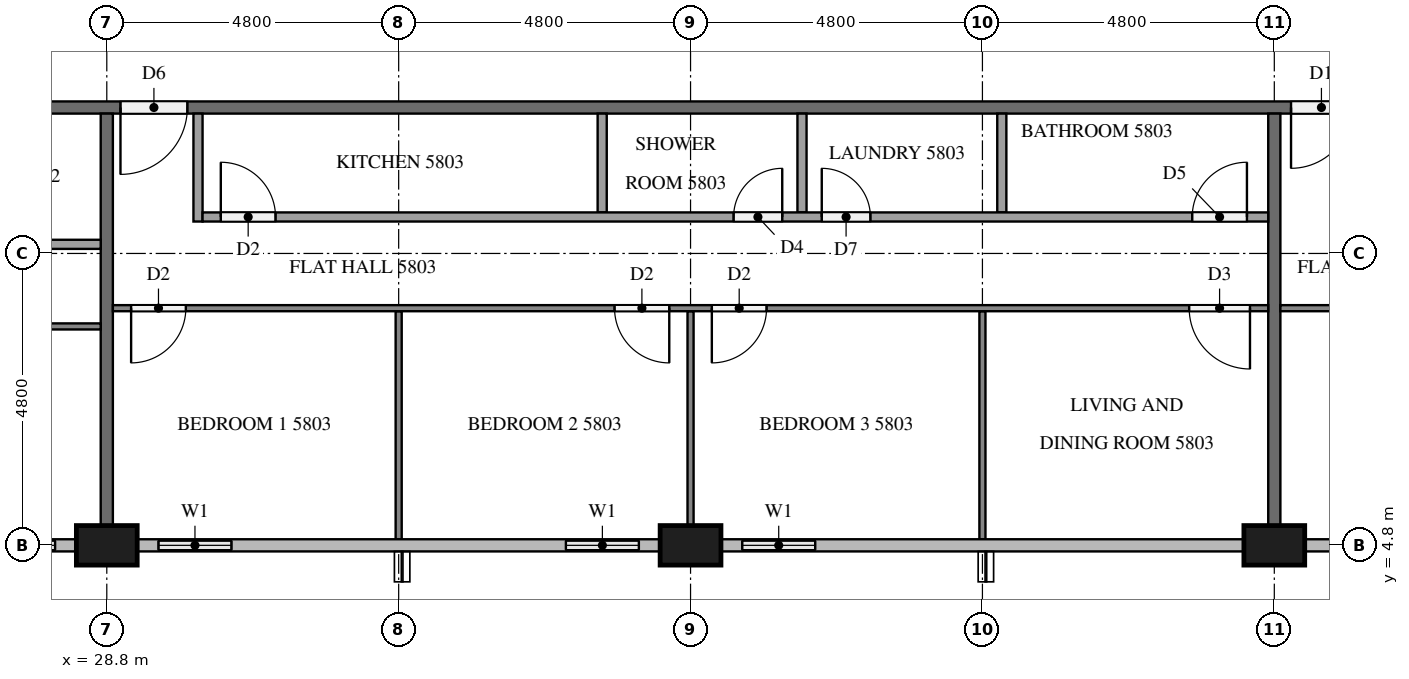
"""IFC4 building model, lengths in metres.
Left out: names, types, materials, properties, quantities, classifications, styles, units other than length and angle.
Written with IfcOpenShell. Run it as: python <this file> out.ifc"""

import sys

from ifc_helpers import new_model, si_unit, direction, frame, frame_2d, origin, origin_2d, place, context, subcontext, project, spatial, rectangle, extrude, element, fill, save


model = new_model("IFC4")
c1 = context("Model", 3, precision=1e-05, world=origin(), true_north=direction((0.0, 1.0)))
c2 = subcontext(c1, "Body", "Model", "MODEL_VIEW")
j1 = project(units=[si_unit("LENGTHUNIT", "METRE"), si_unit("PLANEANGLEUNIT", "RADIAN")], contexts=[c1])
p1 = place(None, origin())
s1 = spatial("IfcSite", under=j1, at=p1, CompositionType="ELEMENT")
p2 = place(p1, origin())
s2 = spatial("IfcBuilding", under=s1, at=p2, CompositionType="ELEMENT")
p3 = place(p2, frame((0.0, 0.0, 222.8)))
s3 = spatial("IfcBuildingStorey", under=s2, at=p3, CompositionType="ELEMENT", Elevation=222.8)
for number, where, z_axis, x_axis in (
    (1, (28.8, 4.8, 0.0), (0.0, 0.0, 1.0), (1.0, 0.0, 0.0)),
    (2, (38.4, 4.8, 0.0), (0.0, 0.0, 1.0), (1.0, 0.0, 0.0)),
    (3, (48.0, 4.8, 0.0), (0.0, 0.0, 1.0), (1.0, 0.0, 0.0)),
):
    element("IfcColumn", number, at=place(p3, frame(where, z_axis=z_axis, x_axis=x_axis)), inside=s3, PredefinedType="COLUMN", context=c2, shape_type="SweptSolid", body=[
        extrude(rectangle(XDim=1.0, YDim=0.65, at=origin_2d()), origin(), (0.0, 0.0, 1.0), 3.2),
    ])
p4 = place(p3, frame((26.4, 4.8, 0.0), z_axis=(0.0, 0.0, 1.0), x_axis=(1.0, 0.0, 0.0)))
e4 = element("IfcWall", 4, at=p4, inside=s3, PredefinedType="SOLIDWALL", context=c2, shape_type="SweptSolid", body=[
    extrude(rectangle(XDim=1.9, YDim=0.15, at=frame_2d((0.95, 0.0))), origin(), (0.0, 0.0, 1.0), 3.2),
])
p5 = place(p4, frame((0.35, 0.0, 0.9)))
e5 = element("IfcOpeningElement", 5, at=p5, cuts=e4, PredefinedType="OPENING", context=c2, shape_type="SweptSolid", body=[
    extrude(rectangle(XDim=1.2, YDim=1.4, at=frame_2d((0.6, 0.7))), frame((0.0, 0.085, 0.0), z_axis=(0.0, -1.0, 0.0), x_axis=(1.0, 0.0, 0.0)), (0.0, 0.0, 1.0), 0.17),
])
p6 = place(p3, frame((29.3, 4.8, 0.0), z_axis=(0.0, 0.0, 1.0), x_axis=(1.0, 0.0, 0.0)))
e6 = element("IfcWall", 6, at=p6, inside=s3, PredefinedType="SOLIDWALL", context=c2, shape_type="SweptSolid", body=[
    extrude(rectangle(XDim=1.9, YDim=0.15, at=frame_2d((0.95, 0.0))), origin(), (0.0, 0.0, 1.0), 3.2),
])
p7 = place(p6, frame((0.35, 0.0, 0.9)))
e7 = element("IfcOpeningElement", 7, at=p7, cuts=e6, PredefinedType="OPENING", context=c2, shape_type="SweptSolid", body=[
    extrude(rectangle(XDim=1.2, YDim=1.4, at=frame_2d((0.6, 0.7))), frame((0.0, 0.085, 0.0), z_axis=(0.0, -1.0, 0.0), x_axis=(1.0, 0.0, 0.0)), (0.0, 0.0, 1.0), 0.17),
])
p8 = place(p3, frame((36.0, 4.8, 0.0), z_axis=(0.0, 0.0, 1.0), x_axis=(1.0, 0.0, 0.0)))
e8 = element("IfcWall", 8, at=p8, inside=s3, PredefinedType="SOLIDWALL", context=c2, shape_type="SweptSolid", body=[
    extrude(rectangle(XDim=1.9, YDim=0.15, at=frame_2d((0.95, 0.0))), origin(), (0.0, 0.0, 1.0), 3.2),
])
p9 = place(p8, frame((0.35, 0.0, 0.9)))
e9 = element("IfcOpeningElement", 9, at=p9, cuts=e8, PredefinedType="OPENING", context=c2, shape_type="SweptSolid", body=[
    extrude(rectangle(XDim=1.2, YDim=1.4, at=frame_2d((0.6, 0.7))), frame((0.0, 0.085, 0.0), z_axis=(0.0, -1.0, 0.0), x_axis=(1.0, 0.0, 0.0)), (0.0, 0.0, 1.0), 0.17),
])
p10 = place(p3, frame((38.9, 4.8, 0.0), z_axis=(0.0, 0.0, 1.0), x_axis=(1.0, 0.0, 0.0)))
e10 = element("IfcWall", 10, at=p10, inside=s3, PredefinedType="SOLIDWALL", context=c2, shape_type="SweptSolid", body=[
    extrude(rectangle(XDim=1.9, YDim=0.15, at=frame_2d((0.95, 0.0))), origin(), (0.0, 0.0, 1.0), 3.2),
])
p11 = place(p10, frame((0.35, 0.0, 0.9)))
e11 = element("IfcOpeningElement", 11, at=p11, cuts=e10, PredefinedType="OPENING", context=c2, shape_type="SweptSolid", body=[
    extrude(rectangle(XDim=1.2, YDim=1.4, at=frame_2d((0.6, 0.7))), frame((0.0, 0.085, 0.0), z_axis=(0.0, -1.0, 0.0), x_axis=(1.0, 0.0, 0.0)), (0.0, 0.0, 1.0), 0.17),
])
p12 = place(p3, frame((50.5, 12.0, 0.0), z_axis=(0.0, 0.0, 1.0), x_axis=(-1.0, 0.0, 0.0)))
e12 = element("IfcWall", 12, at=p12, inside=s3, PredefinedType="PARTITIONING", context=c2, shape_type="SweptSolid", body=[
    extrude(rectangle(XDim=38.6, YDim=0.2, at=frame_2d((19.3, 0.0))), origin(), (0.0, 0.0, 1.0), 3.2),
])
p13 = place(p12, frame((36.375, 0.0, 0.0)))
e13 = element("IfcOpeningElement", 13, at=p13, cuts=e12, PredefinedType="OPENING", context=c2, shape_type="SweptSolid", body=[
    extrude(rectangle(XDim=1.0, YDim=2.1, at=frame_2d((0.5, 1.05))), frame((0.0, 0.11, 0.0), z_axis=(0.0, -1.0, 0.0), x_axis=(1.0, 0.0, 0.0)), (0.0, 0.0, 1.0), 0.22),
])
p14 = place(p12, frame((34.825, 0.0, 0.0)))
e14 = element("IfcOpeningElement", 14, at=p14, cuts=e12, PredefinedType="OPENING", context=c2, shape_type="SweptSolid", body=[
    extrude(rectangle(XDim=1.0, YDim=2.1, at=frame_2d((0.5, 1.05))), frame((0.0, 0.11, 0.0), z_axis=(0.0, -1.0, 0.0), x_axis=(1.0, 0.0, 0.0)), (0.0, 0.0, 1.0), 0.22),
])
p15 = place(p12, frame((20.375, 0.0, 0.0)))
e15 = element("IfcOpeningElement", 15, at=p15, cuts=e12, PredefinedType="OPENING", context=c2, shape_type="SweptSolid", body=[
    extrude(rectangle(XDim=1.1, YDim=2.1, at=frame_2d((0.55, 1.05))), frame((0.0, 0.11, 0.0), z_axis=(0.0, -1.0, 0.0), x_axis=(1.0, 0.0, 0.0)), (0.0, 0.0, 1.0), 0.22),
])
p16 = place(p12, frame((1.225, 0.0, 0.0)))
e16 = element("IfcOpeningElement", 16, at=p16, cuts=e12, PredefinedType="OPENING", context=c2, shape_type="SweptSolid", body=[
    extrude(rectangle(XDim=1.0, YDim=2.1, at=frame_2d((0.5, 1.05))), frame((0.0, 0.11, 0.0), z_axis=(0.0, -1.0, 0.0), x_axis=(1.0, 0.0, 0.0)), (0.0, 0.0, 1.0), 0.22),
])
for number, where, z_axis, x_axis in (
    (17, (28.8, 11.9, 0.0), (0.0, 0.0, 1.0), (0.0, -1.0, 0.0)),
    (18, (48.0, 11.9, 0.0), (0.0, 0.0, 1.0), (0.0, -1.0, 0.0)),
):
    element("IfcWall", number, at=place(p3, frame(where, z_axis=z_axis, x_axis=x_axis)), inside=s3, PredefinedType="PARTITIONING", context=c2, shape_type="SweptSolid", body=[
        extrude(rectangle(XDim=6.775, YDim=0.2, at=frame_2d((3.387, 0.0))), origin(), (0.0, 0.0, 1.0), 3.2),
    ])
p17 = place(p3, frame((28.7, 8.4, 0.0), z_axis=(0.0, 0.0, 1.0), x_axis=(-1.0, 0.0, 0.0)))
e19 = element("IfcWall", 19, at=p17, inside=s3, PredefinedType="PARTITIONING", context=c2, shape_type="SweptSolid", body=[
    extrude(rectangle(XDim=14.2, YDim=0.1, at=frame_2d((7.1, 0.0))), origin(), (0.0, 0.0, 1.0), 3.2),
])
p18 = place(p17, frame((12.9, 0.0, 0.0)))
e20 = element("IfcOpeningElement", 20, at=p18, cuts=e19, PredefinedType="OPENING", context=c2, shape_type="SweptSolid", body=[
    extrude(rectangle(XDim=1.0, YDim=2.1, at=frame_2d((0.5, 1.05))), frame((0.0, 0.06, 0.0), z_axis=(0.0, -1.0, 0.0), x_axis=(1.0, 0.0, 0.0)), (0.0, 0.0, 1.0), 0.12),
])
p19 = place(p17, frame((5.05, 0.0, 0.0)))
e21 = element("IfcOpeningElement", 21, at=p19, cuts=e19, PredefinedType="OPENING", context=c2, shape_type="SweptSolid", body=[
    extrude(rectangle(XDim=0.9, YDim=2.1, at=frame_2d((0.45, 1.05))), frame((0.0, 0.06, 0.0), z_axis=(0.0, -1.0, 0.0), x_axis=(1.0, 0.0, 0.0)), (0.0, 0.0, 1.0), 0.12),
])
p20 = place(p17, frame((3.45, 0.0, 0.0)))
e22 = element("IfcOpeningElement", 22, at=p20, cuts=e19, PredefinedType="OPENING", context=c2, shape_type="SweptSolid", body=[
    extrude(rectangle(XDim=0.9, YDim=2.1, at=frame_2d((0.45, 1.05))), frame((0.0, 0.06, 0.0), z_axis=(0.0, -1.0, 0.0), x_axis=(1.0, 0.0, 0.0)), (0.0, 0.0, 1.0), 0.12),
])
p21 = place(p3, frame((15.975, 9.75, 0.0), z_axis=(0.0, 0.0, 1.0), x_axis=(1.0, 0.0, 0.0)))
e23 = element("IfcWall", 23, at=p21, inside=s3, PredefinedType="PARTITIONING", context=c2, shape_type="SweptSolid", body=[
    extrude(rectangle(XDim=12.725, YDim=0.15, at=frame_2d((6.362, 0.0))), origin(), (0.0, 0.0, 1.0), 3.2),
])
p22 = place(p21, frame((0.3, 0.0, 0.0)))
e24 = element("IfcOpeningElement", 24, at=p22, cuts=e23, PredefinedType="OPENING", context=c2, shape_type="SweptSolid", body=[
    extrude(rectangle(XDim=0.8, YDim=2.1, at=frame_2d((0.4, 1.05))), frame((0.0, 0.085, 0.0), z_axis=(0.0, -1.0, 0.0), x_axis=(1.0, 0.0, 0.0)), (0.0, 0.0, 1.0), 0.17),
])
p23 = place(p21, frame((7.585, 0.0, 0.0)))
e25 = element("IfcOpeningElement", 25, at=p23, cuts=e23, PredefinedType="OPENING", context=c2, shape_type="SweptSolid", body=[
    extrude(rectangle(XDim=0.9, YDim=2.1, at=frame_2d((0.45, 1.05))), frame((0.0, 0.085, 0.0), z_axis=(0.0, -1.0, 0.0), x_axis=(1.0, 0.0, 0.0)), (0.0, 0.0, 1.0), 0.17),
])
p24 = place(p21, frame((9.135, 0.0, 0.0)))
e26 = element("IfcOpeningElement", 26, at=p24, cuts=e23, PredefinedType="OPENING", context=c2, shape_type="SweptSolid", body=[
    extrude(rectangle(XDim=0.9, YDim=2.1, at=frame_2d((0.45, 1.05))), frame((0.0, 0.085, 0.0), z_axis=(0.0, -1.0, 0.0), x_axis=(1.0, 0.0, 0.0)), (0.0, 0.0, 1.0), 0.17),
])
p25 = place(p3, frame((33.6, 8.65, 0.0), z_axis=(0.0, 0.0, 1.0), x_axis=(0.0, -1.0, 0.0)))
e27 = element("IfcWall", 27, at=p25, inside=s3, PredefinedType="PARTITIONING", context=c2, shape_type="SweptSolid", body=[
    extrude(rectangle(XDim=3.75, YDim=0.1, at=frame_2d((1.875, 0.0))), origin(), (0.0, 0.0, 1.0), 3.2),
])
p26 = place(p3, frame((38.4, 8.65, 0.0), z_axis=(0.0, 0.0, 1.0), x_axis=(0.0, -1.0, 0.0)))
e28 = element("IfcWall", 28, at=p26, inside=s3, PredefinedType="PARTITIONING", context=c2, shape_type="SweptSolid", body=[
    extrude(rectangle(XDim=3.525, YDim=0.1, at=frame_2d((1.762, 0.0))), origin(), (0.0, 0.0, 1.0), 3.2),
])
p27 = place(p3, frame((43.2, 8.65, 0.0), z_axis=(0.0, 0.0, 1.0), x_axis=(0.0, -1.0, 0.0)))
e29 = element("IfcWall", 29, at=p27, inside=s3, PredefinedType="PARTITIONING", context=c2, shape_type="SweptSolid", body=[
    extrude(rectangle(XDim=3.75, YDim=0.1, at=frame_2d((1.875, 0.0))), origin(), (0.0, 0.0, 1.0), 3.2),
])
p28 = place(p3, frame((47.9, 8.7, 0.0), z_axis=(0.0, 0.0, 1.0), x_axis=(-1.0, 0.0, 0.0)))
e30 = element("IfcWall", 30, at=p28, inside=s3, PredefinedType="PARTITIONING", context=c2, shape_type="SweptSolid", body=[
    extrude(rectangle(XDim=19.0, YDim=0.1, at=frame_2d((9.5, 0.0))), origin(), (0.0, 0.0, 1.0), 3.2),
])
p29 = place(p28, frame((17.8, 0.0, 0.0)))
e31 = element("IfcOpeningElement", 31, at=p29, cuts=e30, PredefinedType="OPENING", context=c2, shape_type="SweptSolid", body=[
    extrude(rectangle(XDim=0.9, YDim=2.1, at=frame_2d((0.45, 1.05))), frame((0.0, 0.06, 0.0), z_axis=(0.0, -1.0, 0.0), x_axis=(1.0, 0.0, 0.0)), (0.0, 0.0, 1.0), 0.12),
])
p30 = place(p28, frame((9.85, 0.0, 0.0)))
e32 = element("IfcOpeningElement", 32, at=p30, cuts=e30, PredefinedType="OPENING", context=c2, shape_type="SweptSolid", body=[
    extrude(rectangle(XDim=0.9, YDim=2.1, at=frame_2d((0.45, 1.05))), frame((0.0, 0.06, 0.0), z_axis=(0.0, -1.0, 0.0), x_axis=(1.0, 0.0, 0.0)), (0.0, 0.0, 1.0), 0.12),
])
p31 = place(p28, frame((8.25, 0.0, 0.0)))
e33 = element("IfcOpeningElement", 33, at=p31, cuts=e30, PredefinedType="OPENING", context=c2, shape_type="SweptSolid", body=[
    extrude(rectangle(XDim=0.9, YDim=2.1, at=frame_2d((0.45, 1.05))), frame((0.0, 0.06, 0.0), z_axis=(0.0, -1.0, 0.0), x_axis=(1.0, 0.0, 0.0)), (0.0, 0.0, 1.0), 0.12),
])
p32 = place(p28, frame((0.3, 0.0, 0.0)))
e34 = element("IfcOpeningElement", 34, at=p32, cuts=e30, PredefinedType="OPENING", context=c2, shape_type="SweptSolid", body=[
    extrude(rectangle(XDim=1.0, YDim=2.1, at=frame_2d((0.5, 1.05))), frame((0.0, 0.06, 0.0), z_axis=(0.0, -1.0, 0.0), x_axis=(1.0, 0.0, 0.0)), (0.0, 0.0, 1.0), 0.12),
])
for number, where, z_axis, x_axis in (
    (35, (36.947, 11.9, 0.0), (0.0, 0.0, 1.0), (0.0, -1.0, 0.0)),
    (36, (40.233, 11.9, 0.0), (0.0, 0.0, 1.0), (0.0, -1.0, 0.0)),
    (37, (43.519, 11.9, 0.0), (0.0, 0.0, 1.0), (0.0, -1.0, 0.0)),
):
    element("IfcWall", number, at=place(p3, frame(where, z_axis=z_axis, x_axis=x_axis)), inside=s3, PredefinedType="PARTITIONING", context=c2, shape_type="SweptSolid", body=[
        extrude(rectangle(XDim=1.625, YDim=0.15, at=frame_2d((0.812, 0.0))), origin(), (0.0, 0.0, 1.0), 3.2),
    ])
p33 = place(p3, frame((30.3, 11.9, 0.0), z_axis=(0.0, 0.0, 1.0), x_axis=(0.0, -1.0, 0.0)))
e38 = element("IfcWall", 38, at=p33, inside=s3, PredefinedType="PARTITIONING", context=c2, shape_type="SweptSolid", body=[
    extrude(rectangle(XDim=1.775, YDim=0.15, at=frame_2d((0.887, 0.0))), origin(), (0.0, 0.0, 1.0), 3.2),
])
p34 = place(p3, frame((30.375, 10.2, 0.0), z_axis=(0.0, 0.0, 1.0), x_axis=(1.0, 0.0, 0.0)))
e39 = element("IfcWall", 39, at=p34, inside=s3, PredefinedType="PARTITIONING", context=c2, shape_type="SweptSolid", body=[
    extrude(rectangle(XDim=17.525, YDim=0.15, at=frame_2d((8.762, 0.0))), origin(), (0.0, 0.0, 1.0), 3.2),
])
p35 = place(p34, frame((0.3, 0.0, 0.0)))
e40 = element("IfcOpeningElement", 40, at=p35, cuts=e39, PredefinedType="OPENING", context=c2, shape_type="SweptSolid", body=[
    extrude(rectangle(XDim=0.9, YDim=2.1, at=frame_2d((0.45, 1.05))), frame((0.0, 0.085, 0.0), z_axis=(0.0, -1.0, 0.0), x_axis=(1.0, 0.0, 0.0)), (0.0, 0.0, 1.0), 0.17),
])
p36 = place(p34, frame((8.733, 0.0, 0.0)))
e41 = element("IfcOpeningElement", 41, at=p36, cuts=e39, PredefinedType="OPENING", context=c2, shape_type="SweptSolid", body=[
    extrude(rectangle(XDim=0.8, YDim=2.1, at=frame_2d((0.4, 1.05))), frame((0.0, 0.085, 0.0), z_axis=(0.0, -1.0, 0.0), x_axis=(1.0, 0.0, 0.0)), (0.0, 0.0, 1.0), 0.17),
])
p37 = place(p34, frame((10.183, 0.0, 0.0)))
e42 = element("IfcOpeningElement", 42, at=p37, cuts=e39, PredefinedType="OPENING", context=c2, shape_type="SweptSolid", body=[
    extrude(rectangle(XDim=0.8, YDim=2.1, at=frame_2d((0.4, 1.05))), frame((0.0, 0.085, 0.0), z_axis=(0.0, -1.0, 0.0), x_axis=(1.0, 0.0, 0.0)), (0.0, 0.0, 1.0), 0.17),
])
p38 = place(p34, frame((16.275, 0.0, 0.0)))
e43 = element("IfcOpeningElement", 43, at=p38, cuts=e39, PredefinedType="OPENING", context=c2, shape_type="SweptSolid", body=[
    extrude(rectangle(XDim=0.9, YDim=2.1, at=frame_2d((0.45, 1.05))), frame((0.0, 0.085, 0.0), z_axis=(0.0, -1.0, 0.0), x_axis=(1.0, 0.0, 0.0)), (0.0, 0.0, 1.0), 0.17),
])
p39 = place(p3, frame((62.059, 8.7, 0.0), z_axis=(0.0, 0.0, 1.0), x_axis=(-1.0, 0.0, 0.0)))
e44 = element("IfcWall", 44, at=p39, inside=s3, PredefinedType="PARTITIONING", context=c2, shape_type="SweptSolid", body=[
    extrude(rectangle(XDim=13.959, YDim=0.1, at=frame_2d((6.979, 0.0))), origin(), (0.0, 0.0, 1.0), 3.2),
])
p40 = place(p39, frame((9.609, 0.0, 0.0)))
e45 = element("IfcOpeningElement", 45, at=p40, cuts=e44, PredefinedType="OPENING", context=c2, shape_type="SweptSolid", body=[
    extrude(rectangle(XDim=1.0, YDim=2.1, at=frame_2d((0.5, 1.05))), frame((0.0, 0.06, 0.0), z_axis=(0.0, -1.0, 0.0), x_axis=(1.0, 0.0, 0.0)), (0.0, 0.0, 1.0), 0.12),
])
p41 = place(p39, frame((8.009, 0.0, 0.0)))
e46 = element("IfcOpeningElement", 46, at=p41, cuts=e44, PredefinedType="OPENING", context=c2, shape_type="SweptSolid", body=[
    extrude(rectangle(XDim=0.9, YDim=2.1, at=frame_2d((0.45, 1.05))), frame((0.0, 0.06, 0.0), z_axis=(0.0, -1.0, 0.0), x_axis=(1.0, 0.0, 0.0)), (0.0, 0.0, 1.0), 0.12),
])
p42 = place(p39, frame((0.3, 0.0, 0.0)))
e47 = element("IfcOpeningElement", 47, at=p42, cuts=e44, PredefinedType="OPENING", context=c2, shape_type="SweptSolid", body=[
    extrude(rectangle(XDim=0.9, YDim=2.1, at=frame_2d((0.45, 1.05))), frame((0.0, 0.06, 0.0), z_axis=(0.0, -1.0, 0.0), x_axis=(1.0, 0.0, 0.0)), (0.0, 0.0, 1.0), 0.12),
])
p43 = place(p5, origin())
e48 = element("IfcWindow", 48, at=p43, inside=s3, PartitioningType="SINGLE_PANEL", PredefinedType="WINDOW", context=c2, shape_type="SweptSolid", body=[
    extrude(rectangle(XDim=1.2, YDim=1.4, at=frame_2d((0.6, 0.7))), frame((0.0, 0.03, 0.0), z_axis=(0.0, -1.0, 0.0), x_axis=(1.0, 0.0, 0.0)), (0.0, 0.0, 1.0), 0.06),
])
fill(e5, e48)
p44 = place(p7, origin())
e49 = element("IfcWindow", 49, at=p44, inside=s3, PartitioningType="SINGLE_PANEL", PredefinedType="WINDOW", context=c2, shape_type="SweptSolid", body=[
    extrude(rectangle(XDim=1.2, YDim=1.4, at=frame_2d((0.6, 0.7))), frame((0.0, 0.03, 0.0), z_axis=(0.0, -1.0, 0.0), x_axis=(1.0, 0.0, 0.0)), (0.0, 0.0, 1.0), 0.06),
])
fill(e7, e49)
p45 = place(p9, origin())
e50 = element("IfcWindow", 50, at=p45, inside=s3, PartitioningType="SINGLE_PANEL", PredefinedType="WINDOW", context=c2, shape_type="SweptSolid", body=[
    extrude(rectangle(XDim=1.2, YDim=1.4, at=frame_2d((0.6, 0.7))), frame((0.0, 0.03, 0.0), z_axis=(0.0, -1.0, 0.0), x_axis=(1.0, 0.0, 0.0)), (0.0, 0.0, 1.0), 0.06),
])
fill(e9, e50)
p46 = place(p11, origin())
e51 = element("IfcWindow", 51, at=p46, inside=s3, PartitioningType="SINGLE_PANEL", PredefinedType="WINDOW", context=c2, shape_type="SweptSolid", body=[
    extrude(rectangle(XDim=1.2, YDim=1.4, at=frame_2d((0.6, 0.7))), frame((0.0, 0.03, 0.0), z_axis=(0.0, -1.0, 0.0), x_axis=(1.0, 0.0, 0.0)), (0.0, 0.0, 1.0), 0.06),
])
fill(e11, e51)
p47 = place(p15, origin())
e52 = element("IfcDoor", 52, at=p47, inside=s3, OperationType="SINGLE_SWING_RIGHT", PredefinedType="DOOR", context=c2, shape_type="SweptSolid", body=[
    extrude(rectangle(XDim=1.1, YDim=2.1, at=frame_2d((0.55, 1.05))), frame((0.0, 0.025, 0.0), z_axis=(0.0, -1.0, 0.0), x_axis=(1.0, 0.0, 0.0)), (0.0, 0.0, 1.0), 0.05),
])
fill(e15, e52)
p48 = place(p16, origin())
e53 = element("IfcDoor", 53, at=p48, inside=s3, OperationType="SINGLE_SWING_RIGHT", PredefinedType="DOOR", context=c2, shape_type="SweptSolid", body=[
    extrude(rectangle(XDim=1.0, YDim=2.1, at=frame_2d((0.5, 1.05))), frame((0.0, 0.025, 0.0), z_axis=(0.0, -1.0, 0.0), x_axis=(1.0, 0.0, 0.0)), (0.0, 0.0, 1.0), 0.05),
])
fill(e16, e53)
p49 = place(p29, origin())
e54 = element("IfcDoor", 54, at=p49, inside=s3, OperationType="SINGLE_SWING_RIGHT", PredefinedType="DOOR", context=c2, shape_type="SweptSolid", body=[
    extrude(rectangle(XDim=0.9, YDim=2.1, at=frame_2d((0.45, 1.05))), frame((0.0, 0.025, 0.0), z_axis=(0.0, -1.0, 0.0), x_axis=(1.0, 0.0, 0.0)), (0.0, 0.0, 1.0), 0.05),
])
fill(e31, e54)
p50 = place(p30, origin())
e55 = element("IfcDoor", 55, at=p50, inside=s3, OperationType="SINGLE_SWING_LEFT", PredefinedType="DOOR", context=c2, shape_type="SweptSolid", body=[
    extrude(rectangle(XDim=0.9, YDim=2.1, at=frame_2d((0.45, 1.05))), frame((0.0, 0.025, 0.0), z_axis=(0.0, -1.0, 0.0), x_axis=(1.0, 0.0, 0.0)), (0.0, 0.0, 1.0), 0.05),
])
fill(e32, e55)
p51 = place(p31, origin())
e56 = element("IfcDoor", 56, at=p51, inside=s3, OperationType="SINGLE_SWING_RIGHT", PredefinedType="DOOR", context=c2, shape_type="SweptSolid", body=[
    extrude(rectangle(XDim=0.9, YDim=2.1, at=frame_2d((0.45, 1.05))), frame((0.0, 0.025, 0.0), z_axis=(0.0, -1.0, 0.0), x_axis=(1.0, 0.0, 0.0)), (0.0, 0.0, 1.0), 0.05),
])
fill(e33, e56)
p52 = place(p32, origin())
e57 = element("IfcDoor", 57, at=p52, inside=s3, OperationType="SINGLE_SWING_LEFT", PredefinedType="DOOR", context=c2, shape_type="SweptSolid", body=[
    extrude(rectangle(XDim=1.0, YDim=2.1, at=frame_2d((0.5, 1.05))), frame((0.0, 0.025, 0.0), z_axis=(0.0, -1.0, 0.0), x_axis=(1.0, 0.0, 0.0)), (0.0, 0.0, 1.0), 0.05),
])
fill(e34, e57)
p53 = place(p35, origin())
e58 = element("IfcDoor", 58, at=p53, inside=s3, OperationType="SINGLE_SWING_LEFT", PredefinedType="DOOR", context=c2, shape_type="SweptSolid", body=[
    extrude(rectangle(XDim=0.9, YDim=2.1, at=frame_2d((0.45, 1.05))), frame((0.0, 0.025, 0.0), z_axis=(0.0, -1.0, 0.0), x_axis=(1.0, 0.0, 0.0)), (0.0, 0.0, 1.0), 0.05),
])
fill(e40, e58)
p54 = place(p36, origin())
e59 = element("IfcDoor", 59, at=p54, inside=s3, OperationType="SINGLE_SWING_RIGHT", PredefinedType="DOOR", context=c2, shape_type="SweptSolid", body=[
    extrude(rectangle(XDim=0.8, YDim=2.1, at=frame_2d((0.4, 1.05))), frame((0.0, 0.025, 0.0), z_axis=(0.0, -1.0, 0.0), x_axis=(1.0, 0.0, 0.0)), (0.0, 0.0, 1.0), 0.05),
])
fill(e41, e59)
p55 = place(p37, origin())
e60 = element("IfcDoor", 60, at=p55, inside=s3, OperationType="SINGLE_SWING_LEFT", PredefinedType="DOOR", context=c2, shape_type="SweptSolid", body=[
    extrude(rectangle(XDim=0.8, YDim=2.1, at=frame_2d((0.4, 1.05))), frame((0.0, 0.025, 0.0), z_axis=(0.0, -1.0, 0.0), x_axis=(1.0, 0.0, 0.0)), (0.0, 0.0, 1.0), 0.05),
])
fill(e42, e60)
p56 = place(p38, origin())
e61 = element("IfcDoor", 61, at=p56, inside=s3, OperationType="SINGLE_SWING_RIGHT", PredefinedType="DOOR", context=c2, shape_type="SweptSolid", body=[
    extrude(rectangle(XDim=0.9, YDim=2.1, at=frame_2d((0.45, 1.05))), frame((0.0, 0.025, 0.0), z_axis=(0.0, -1.0, 0.0), x_axis=(1.0, 0.0, 0.0)), (0.0, 0.0, 1.0), 0.05),
])
fill(e43, e61)
save(model, sys.argv[1])
